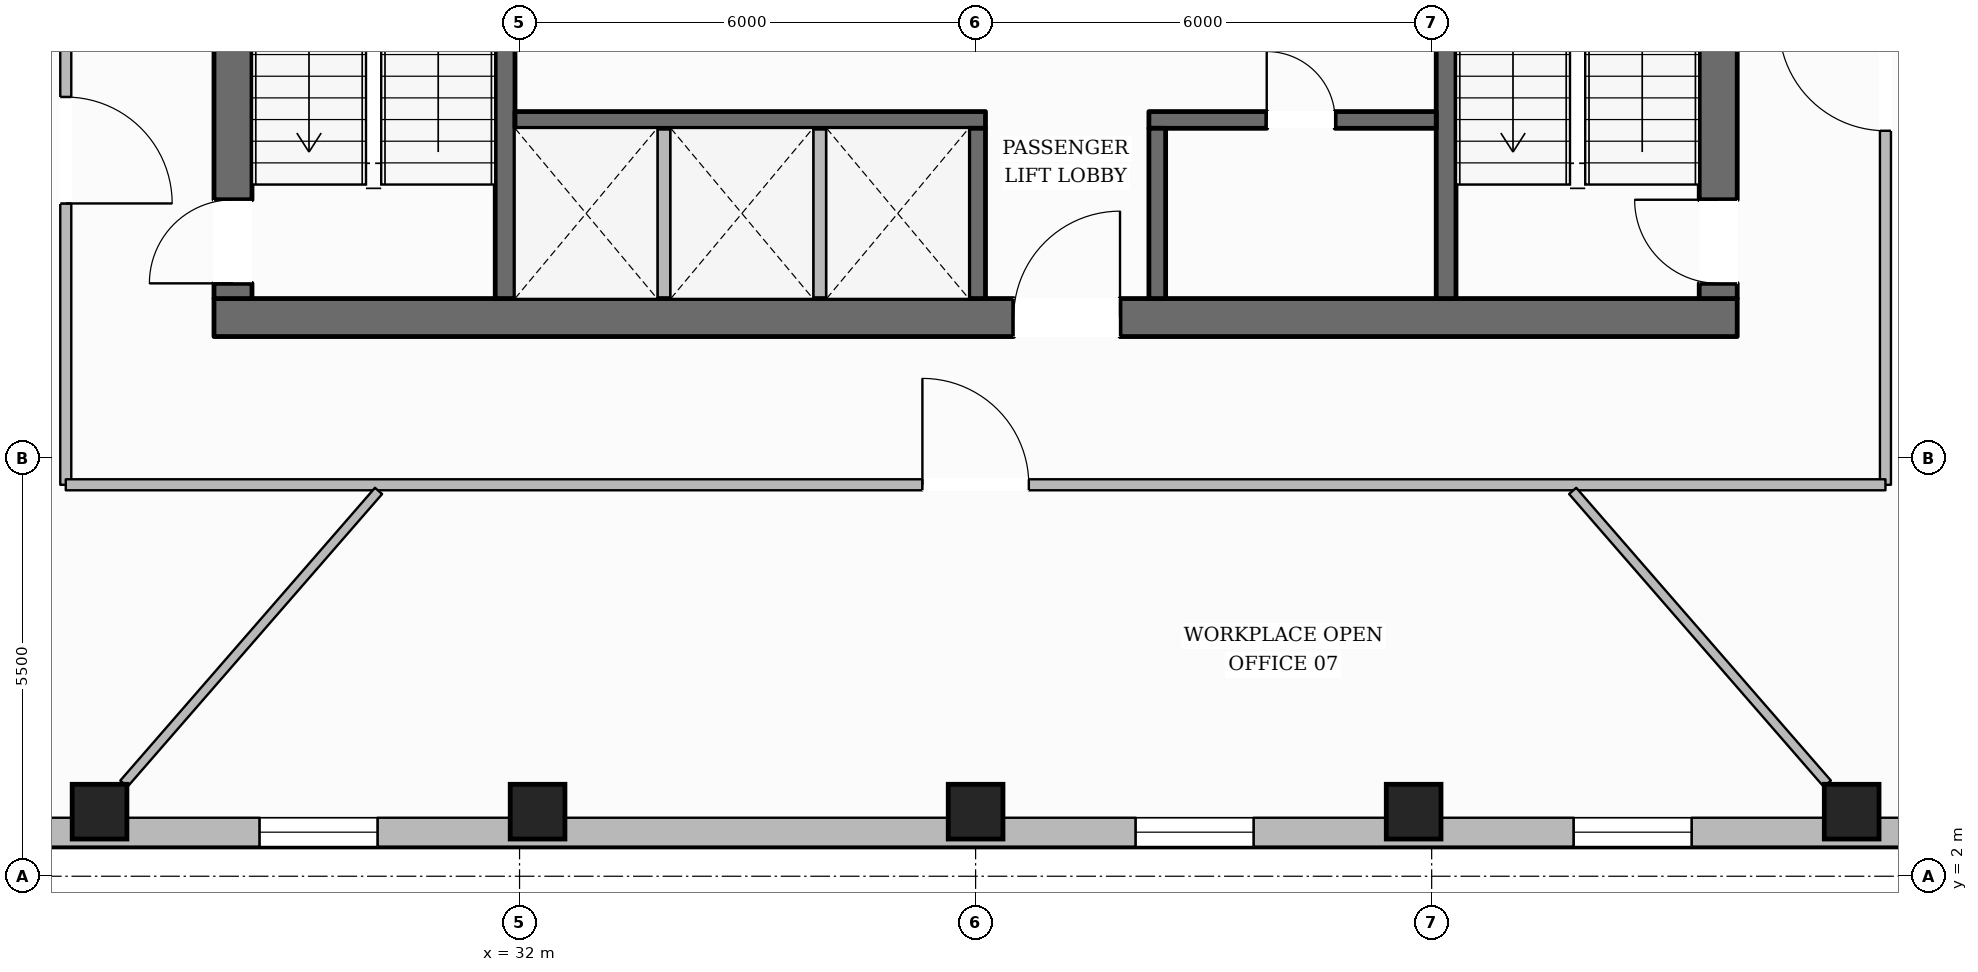
"""IFC4 building model, lengths in metres.
Left out: names, types, materials, properties, quantities, classifications, styles, units other than length and angle.
Written with IfcOpenShell. Run it as: python <this file> out.ifc"""

import sys

from ifc_helpers import new_model, si_unit, direction, frame, frame_2d, origin, origin_2d, place, context, subcontext, project, spatial, rectangle, hollow_rectangle, extrude, element, fill, save


model = new_model("IFC4")
c1 = context("Model", 3, precision=1e-05, world=origin(), true_north=direction((0.0, 1.0)))
c2 = subcontext(c1, "Body", "Model", "MODEL_VIEW")
j1 = project(units=[si_unit("LENGTHUNIT", "METRE"), si_unit("PLANEANGLEUNIT", "RADIAN")], contexts=[c1])
p1 = place(None, origin())
s1 = spatial("IfcSite", under=j1, at=p1, CompositionType="ELEMENT")
p2 = place(p1, origin())
s2 = spatial("IfcBuilding", under=s1, at=p2, CompositionType="ELEMENT")
p3 = place(p2, frame((0.0, 0.0, 93.2)))
s3 = spatial("IfcBuildingStorey", under=s2, at=p3, CompositionType="ELEMENT", Elevation=93.2)
p4 = place(p3, frame((27.98, 9.35, 0.0), z_axis=(0.0, 0.0, 1.0), x_axis=(1.0, 0.0, 0.0)))
e1 = element("IfcWall", 1, at=p4, inside=s3, PredefinedType="SOLIDWALL", context=c2, shape_type="SweptSolid", body=[
    extrude(rectangle(XDim=20.04, YDim=0.5, at=frame_2d((10.02, 0.0))), origin(), (0.0, 0.0, 1.0), 3.6),
])
p5 = place(p4, frame((10.52, 0.0, 0.0)))
e2 = element("IfcOpeningElement", 2, at=p5, cuts=e1, PredefinedType="OPENING", context=c2, shape_type="SweptSolid", body=[
    extrude(rectangle(XDim=1.4, YDim=2.2, at=frame_2d((0.7, 1.1))), frame((0.0, 0.26, 0.0), z_axis=(0.0, -1.0, 0.0), x_axis=(1.0, 0.0, 0.0)), (0.0, 0.0, 1.0), 0.52),
])
p6 = place(p3, frame((28.23, 9.6, 0.0), z_axis=(0.0, 0.0, 1.0), x_axis=(0.0, 1.0, 0.0)))
e3 = element("IfcWall", 3, at=p6, inside=s3, PredefinedType="SOLIDWALL", context=c2, shape_type="SweptSolid", body=[
    extrude(rectangle(XDim=13.0, YDim=0.5, at=frame_2d((6.5, 0.0))), origin(), (0.0, 0.0, 1.0), 3.6),
])
p7 = place(p6, frame((0.2, 0.0, 0.0)))
e4 = element("IfcOpeningElement", 4, at=p7, cuts=e3, PredefinedType="OPENING", context=c2, shape_type="SweptSolid", body=[
    extrude(rectangle(XDim=1.1, YDim=2.15, at=frame_2d((0.55, 1.075))), frame((0.0, 0.26, 0.0), z_axis=(0.0, -1.0, 0.0), x_axis=(1.0, 0.0, 0.0)), (0.0, 0.0, 1.0), 0.52),
])
p8 = place(p6, frame((8.4, 0.0, 0.0)))
e5 = element("IfcOpeningElement", 5, at=p8, cuts=e3, PredefinedType="OPENING", context=c2, shape_type="SweptSolid", body=[
    extrude(rectangle(XDim=0.9, YDim=2.1, at=frame_2d((0.45, 1.05))), frame((0.0, 0.26, 0.0), z_axis=(0.0, -1.0, 0.0), x_axis=(1.0, 0.0, 0.0)), (0.0, 0.0, 1.0), 0.52),
])
p9 = place(p3, frame((47.77, 9.6, 0.0), z_axis=(0.0, 0.0, 1.0), x_axis=(0.0, 1.0, 0.0)))
e6 = element("IfcWall", 6, at=p9, inside=s3, PredefinedType="SOLIDWALL", context=c2, shape_type="SweptSolid", body=[
    extrude(rectangle(XDim=13.0, YDim=0.5, at=frame_2d((6.5, 0.0))), origin(), (0.0, 0.0, 1.0), 3.6),
])
p10 = place(p9, frame((0.2, 0.0, 0.0)))
e7 = element("IfcOpeningElement", 7, at=p10, cuts=e6, PredefinedType="OPENING", context=c2, shape_type="SweptSolid", body=[
    extrude(rectangle(XDim=1.1, YDim=2.15, at=frame_2d((0.55, 1.075))), frame((0.0, 0.26, 0.0), z_axis=(0.0, -1.0, 0.0), x_axis=(1.0, 0.0, 0.0)), (0.0, 0.0, 1.0), 0.52),
])
p11 = place(p9, frame((8.4, 0.0, 0.0)))
e8 = element("IfcOpeningElement", 8, at=p11, cuts=e6, PredefinedType="OPENING", context=c2, shape_type="SweptSolid", body=[
    extrude(rectangle(XDim=0.9, YDim=2.1, at=frame_2d((0.45, 1.05))), frame((0.0, 0.26, 0.0), z_axis=(0.0, -1.0, 0.0), x_axis=(1.0, 0.0, 0.0)), (0.0, 0.0, 1.0), 0.52),
])
p12 = place(p3, frame((31.81, 9.6, 0.0), z_axis=(0.0, 0.0, 1.0), x_axis=(0.0, 1.0, 0.0)))
e9 = element("IfcWall", 9, at=p12, inside=s3, PredefinedType="SHEAR", context=c2, shape_type="SweptSolid", body=[
    extrude(rectangle(XDim=13.0, YDim=0.26, at=frame_2d((6.5, 0.0))), origin(), (0.0, 0.0, 1.0), 3.6),
])
p13 = place(p12, frame((10.925, 0.0, 0.0)))
e10 = element("IfcOpeningElement", 10, at=p13, cuts=e9, PredefinedType="OPENING", context=c2, shape_type="SweptSolid", body=[
    extrude(rectangle(XDim=1.25, YDim=2.25, at=frame_2d((0.625, 1.125))), frame((0.0, 0.14, 0.0), z_axis=(0.0, -1.0, 0.0), x_axis=(1.0, 0.0, 0.0)), (0.0, 0.0, 1.0), 0.28),
])
p14 = place(p3, frame((44.19, 9.6, 0.0), z_axis=(0.0, 0.0, 1.0), x_axis=(0.0, 1.0, 0.0)))
e11 = element("IfcWall", 11, at=p14, inside=s3, PredefinedType="SHEAR", context=c2, shape_type="SweptSolid", body=[
    extrude(rectangle(XDim=13.0, YDim=0.26, at=frame_2d((6.5, 0.0))), origin(), (0.0, 0.0, 1.0), 3.6),
])
p15 = place(p14, frame((10.925, 0.0, 0.0)))
e12 = element("IfcOpeningElement", 12, at=p15, cuts=e11, PredefinedType="OPENING", context=c2, shape_type="SweptSolid", body=[
    extrude(rectangle(XDim=1.25, YDim=2.25, at=frame_2d((0.625, 1.125))), frame((0.0, 0.14, 0.0), z_axis=(0.0, -1.0, 0.0), x_axis=(1.0, 0.0, 0.0)), (0.0, 0.0, 1.0), 0.28),
])
p16 = place(p3, frame((31.94, 11.95, 0.0), z_axis=(0.0, 0.0, 1.0), x_axis=(1.0, 0.0, 0.0)))
e13 = element("IfcWall", 13, at=p16, inside=s3, PredefinedType="SOLIDWALL", context=c2, shape_type="SweptSolid", body=[
    extrude(rectangle(XDim=6.19, YDim=0.22, at=frame_2d((3.095, 0.0))), origin(), (0.0, 0.0, 1.0), 3.6),
])
p17 = place(p3, frame((40.28, 11.95, 0.0), z_axis=(0.0, 0.0, 1.0), x_axis=(1.0, 0.0, 0.0)))
e14 = element("IfcWall", 14, at=p17, inside=s3, PredefinedType="SOLIDWALL", context=c2, shape_type="SweptSolid", body=[
    extrude(rectangle(XDim=3.78, YDim=0.22, at=frame_2d((1.89, 0.0))), origin(), (0.0, 0.0, 1.0), 3.6),
])
p18 = place(p17, frame((1.55, 0.0, 0.0)))
e15 = element("IfcOpeningElement", 15, at=p18, cuts=e14, PredefinedType="OPENING", context=c2, shape_type="SweptSolid", body=[
    extrude(rectangle(XDim=0.9, YDim=2.1, at=frame_2d((0.45, 1.05))), frame((0.0, 0.12, 0.0), z_axis=(0.0, -1.0, 0.0), x_axis=(1.0, 0.0, 0.0)), (0.0, 0.0, 1.0), 0.24),
])
for number, where, z_axis, x_axis in (
    (16, (38.02, 9.6, 0.0), (0.0, 0.0, 1.0), (0.0, 1.0, 0.0)),
    (17, (40.39, 9.6, 0.0), (0.0, 0.0, 1.0), (0.0, 1.0, 0.0)),
):
    element("IfcWall", number, at=place(p3, frame(where, z_axis=z_axis, x_axis=x_axis)), inside=s3, PredefinedType="SOLIDWALL", context=c2, shape_type="SweptSolid", body=[
        extrude(rectangle(XDim=2.24, YDim=0.22, at=frame_2d((1.12, 0.0))), origin(), (0.0, 0.0, 1.0), 3.6),
    ])
for number, where, z_axis, x_axis in (
    (18, (26.474, 2.85, 0.0), (0.0, 0.0, 1.0), (1.0, 0.0, 0.0)),
    (19, (32.237, 2.85, 0.0), (0.0, 0.0, 1.0), (1.0, 0.0, 0.0)),
    (20, (38.0, 2.85, 0.0), (0.0, 0.0, 1.0), (1.0, 0.0, 0.0)),
    (21, (43.763, 2.85, 0.0), (0.0, 0.0, 1.0), (1.0, 0.0, 0.0)),
    (22, (49.526, 2.85, 0.0), (0.0, 0.0, 1.0), (1.0, 0.0, 0.0)),
):
    element("IfcColumn", number, at=place(p3, frame(where, z_axis=z_axis, x_axis=x_axis)), inside=s3, PredefinedType="COLUMN", context=c2, shape_type="SweptSolid", body=[
        extrude(hollow_rectangle(XDim=0.72, YDim=0.72, WallThickness=0.032, at=origin_2d()), origin(), (0.0, 0.0, 1.0), 3.6),
    ])
p19 = place(p3, frame((55.768, 2.58, 0.0), z_axis=(0.0, 0.0, 1.0), x_axis=(-1.0, 0.0, 0.0)))
e23 = element("IfcWall", 23, at=p19, inside=s3, PredefinedType="STANDARD", context=c2, shape_type="SweptSolid", body=[
    extrude(rectangle(XDim=35.535, YDim=0.38, at=frame_2d((17.768, 0.0))), origin(), (0.0, 0.0, 1.0), 3.059),
])
p20 = place(p19, frame((31.399, 0.0, 0.65)))
e24 = element("IfcOpeningElement", 24, at=p20, cuts=e23, PredefinedType="OPENING", context=c2, shape_type="SweptSolid", body=[
    extrude(rectangle(XDim=1.55, YDim=1.75, at=frame_2d((0.775, 0.875))), frame((0.0, 0.2, 0.0), z_axis=(0.0, -1.0, 0.0), x_axis=(1.0, 0.0, 0.0)), (0.0, 0.0, 1.0), 0.4),
])
p21 = place(p19, frame((25.637, 0.0, 0.65)))
e25 = element("IfcOpeningElement", 25, at=p21, cuts=e23, PredefinedType="OPENING", context=c2, shape_type="SweptSolid", body=[
    extrude(rectangle(XDim=1.55, YDim=1.75, at=frame_2d((0.775, 0.875))), frame((0.0, 0.2, 0.0), z_axis=(0.0, -1.0, 0.0), x_axis=(1.0, 0.0, 0.0)), (0.0, 0.0, 1.0), 0.4),
])
p22 = place(p19, frame((14.111, 0.0, 0.65)))
e26 = element("IfcOpeningElement", 26, at=p22, cuts=e23, PredefinedType="OPENING", context=c2, shape_type="SweptSolid", body=[
    extrude(rectangle(XDim=1.55, YDim=1.75, at=frame_2d((0.775, 0.875))), frame((0.0, 0.2, 0.0), z_axis=(0.0, -1.0, 0.0), x_axis=(1.0, 0.0, 0.0)), (0.0, 0.0, 1.0), 0.4),
])
p23 = place(p19, frame((8.348, 0.0, 0.65)))
e27 = element("IfcOpeningElement", 27, at=p23, cuts=e23, PredefinedType="OPENING", context=c2, shape_type="SweptSolid", body=[
    extrude(rectangle(XDim=1.55, YDim=1.75, at=frame_2d((0.775, 0.875))), frame((0.0, 0.2, 0.0), z_axis=(0.0, -1.0, 0.0), x_axis=(1.0, 0.0, 0.0)), (0.0, 0.0, 1.0), 0.4),
])
p24 = place(p19, frame((2.585, 0.0, 0.65)))
e28 = element("IfcOpeningElement", 28, at=p24, cuts=e23, PredefinedType="OPENING", context=c2, shape_type="SweptSolid", body=[
    extrude(rectangle(XDim=1.55, YDim=1.75, at=frame_2d((0.775, 0.875))), frame((0.0, 0.2, 0.0), z_axis=(0.0, -1.0, 0.0), x_axis=(1.0, 0.0, 0.0)), (0.0, 0.0, 1.0), 0.4),
])
for number, where, z_axis, x_axis in (
    (29, (33.9, 9.55, 0.0), (0.0, 0.0, 1.0), (0.0, 1.0, 0.0)),
    (30, (35.95, 9.55, 0.0), (0.0, 0.0, 1.0), (0.0, 1.0, 0.0)),
):
    element("IfcWall", number, at=place(p3, frame(where, z_axis=z_axis, x_axis=x_axis)), inside=s3, PredefinedType="PARTITIONING", context=c2, shape_type="SweptSolid", body=[
        extrude(rectangle(XDim=2.29, YDim=0.165, at=frame_2d((1.145, 0.0))), origin(), (0.0, 0.0, 1.0), 3.6),
    ])
p25 = place(p3, frame((49.97, 7.15, 0.0), z_axis=(0.0, 0.0, 1.0), x_axis=(0.0, 1.0, 0.0)))
e31 = element("IfcWall", 31, at=p25, inside=s3, PredefinedType="PARTITIONING", context=c2, shape_type="SweptSolid", body=[
    extrude(rectangle(XDim=17.9, YDim=0.145, at=frame_2d((8.95, 0.0))), origin(), (0.0, 0.0, 1.0), 3.288),
])
p26 = place(p25, frame((13.437, 0.0, 0.0)))
e32 = element("IfcOpeningElement", 32, at=p26, cuts=e31, PredefinedType="OPENING", context=c2, shape_type="SweptSolid", body=[
    extrude(rectangle(XDim=1.4, YDim=2.2, at=frame_2d((0.7, 1.1))), frame((0.0, 0.083, 0.0), z_axis=(0.0, -1.0, 0.0), x_axis=(1.0, 0.0, 0.0)), (0.0, 0.0, 1.0), 0.165),
])
p27 = place(p25, frame((4.658, 0.0, 0.0)))
e33 = element("IfcOpeningElement", 33, at=p27, cuts=e31, PredefinedType="OPENING", context=c2, shape_type="SweptSolid", body=[
    extrude(rectangle(XDim=1.4, YDim=2.2, at=frame_2d((0.7, 1.1))), frame((0.0, 0.083, 0.0), z_axis=(0.0, -1.0, 0.0), x_axis=(1.0, 0.0, 0.0)), (0.0, 0.0, 1.0), 0.165),
])
p28 = place(p3, frame((26.03, 25.05, 0.0), z_axis=(0.0, 0.0, 1.0), x_axis=(0.0, -1.0, 0.0)))
e34 = element("IfcWall", 34, at=p28, inside=s3, PredefinedType="PARTITIONING", context=c2, shape_type="SweptSolid", body=[
    extrude(rectangle(XDim=17.9, YDim=0.145, at=frame_2d((8.95, 0.0))), origin(), (0.0, 0.0, 1.0), 3.288),
])
p29 = place(p28, frame((4.67, 0.0, 0.0)))
e35 = element("IfcOpeningElement", 35, at=p29, cuts=e34, PredefinedType="OPENING", context=c2, shape_type="SweptSolid", body=[
    extrude(rectangle(XDim=0.98, YDim=2.15, at=frame_2d((0.49, 1.075))), frame((0.0, 0.083, 0.0), z_axis=(0.0, -1.0, 0.0), x_axis=(1.0, 0.0, 0.0)), (0.0, 0.0, 1.0), 0.165),
])
p30 = place(p28, frame((12.799, 0.0, 0.0)))
e36 = element("IfcOpeningElement", 36, at=p30, cuts=e34, PredefinedType="OPENING", context=c2, shape_type="SweptSolid", body=[
    extrude(rectangle(XDim=1.4, YDim=2.2, at=frame_2d((0.7, 1.1))), frame((0.0, 0.083, 0.0), z_axis=(0.0, -1.0, 0.0), x_axis=(1.0, 0.0, 0.0)), (0.0, 0.0, 1.0), 0.165),
])
p31 = place(p3, frame((26.03, 7.15, 0.0), z_axis=(0.0, 0.0, 1.0), x_axis=(1.0, 0.0, 0.0)))
e37 = element("IfcWall", 37, at=p31, inside=s3, PredefinedType="PARTITIONING", context=c2, shape_type="SweptSolid", body=[
    extrude(rectangle(XDim=23.94, YDim=0.145, at=frame_2d((11.97, 0.0))), origin(), (0.0, 0.0, 1.0), 3.6),
])
p32 = place(p31, frame((11.27, 0.0, 0.0)))
e38 = element("IfcOpeningElement", 38, at=p32, cuts=e37, PredefinedType="OPENING", context=c2, shape_type="SweptSolid", body=[
    extrude(rectangle(XDim=1.4, YDim=2.2, at=frame_2d((0.7, 1.1))), frame((0.0, 0.083, 0.0), z_axis=(0.0, -1.0, 0.0), x_axis=(1.0, 0.0, 0.0)), (0.0, 0.0, 1.0), 0.165),
])
for number, where, z_axis, x_axis in (
    (39, (30.145, 7.07, 0.0), (0.0, 0.0, 1.0), (-0.656, -0.754, 0.0)),
    (40, (45.855, 7.07, 0.0), (0.0, 0.0, 1.0), (0.656, -0.754, 0.0)),
):
    element("IfcWall", number, at=place(p3, frame(where, z_axis=z_axis, x_axis=x_axis)), inside=s3, PredefinedType="PARTITIONING", context=c2, shape_type="SweptSolid", body=[
        extrude(rectangle(XDim=5.105, YDim=0.125, at=frame_2d((2.553, 0.0))), origin(), (0.0, 0.0, 1.0), 3.6),
    ])
p33 = place(p21, origin())
e41 = element("IfcWindow", 41, at=p33, inside=s3, PartitioningType="SINGLE_PANEL", PredefinedType="WINDOW", context=c2, shape_type="SweptSolid", body=[
    extrude(rectangle(XDim=1.55, YDim=1.75, at=frame_2d((0.775, 0.875))), frame((0.0, 0.03, 0.0), z_axis=(0.0, -1.0, 0.0), x_axis=(1.0, 0.0, 0.0)), (0.0, 0.0, 1.0), 0.06),
])
fill(e25, e41)
p34 = place(p22, origin())
e42 = element("IfcWindow", 42, at=p34, inside=s3, PartitioningType="SINGLE_PANEL", PredefinedType="WINDOW", context=c2, shape_type="SweptSolid", body=[
    extrude(rectangle(XDim=1.55, YDim=1.75, at=frame_2d((0.775, 0.875))), frame((0.0, 0.03, 0.0), z_axis=(0.0, -1.0, 0.0), x_axis=(1.0, 0.0, 0.0)), (0.0, 0.0, 1.0), 0.06),
])
fill(e26, e42)
p35 = place(p23, origin())
e43 = element("IfcWindow", 43, at=p35, inside=s3, PartitioningType="SINGLE_PANEL", PredefinedType="WINDOW", context=c2, shape_type="SweptSolid", body=[
    extrude(rectangle(XDim=1.55, YDim=1.75, at=frame_2d((0.775, 0.875))), frame((0.0, 0.03, 0.0), z_axis=(0.0, -1.0, 0.0), x_axis=(1.0, 0.0, 0.0)), (0.0, 0.0, 1.0), 0.06),
])
fill(e27, e43)
p36 = place(p7, origin())
e44 = element("IfcDoor", 44, at=p36, inside=s3, OperationType="SINGLE_SWING_LEFT", PredefinedType="DOOR", context=c2, shape_type="SweptSolid", body=[
    extrude(rectangle(XDim=1.1, YDim=2.15, at=frame_2d((0.55, 1.075))), frame((0.0, 0.025, 0.0), z_axis=(0.0, -1.0, 0.0), x_axis=(1.0, 0.0, 0.0)), (0.0, 0.0, 1.0), 0.05),
])
fill(e4, e44)
p37 = place(p10, origin())
e45 = element("IfcDoor", 45, at=p37, inside=s3, OperationType="SINGLE_SWING_RIGHT", PredefinedType="DOOR", context=c2, shape_type="SweptSolid", body=[
    extrude(rectangle(XDim=1.1, YDim=2.15, at=frame_2d((0.55, 1.075))), frame((0.0, 0.025, 0.0), z_axis=(0.0, -1.0, 0.0), x_axis=(1.0, 0.0, 0.0)), (0.0, 0.0, 1.0), 0.05),
])
fill(e7, e45)
p38 = place(p5, origin())
e46 = element("IfcDoor", 46, at=p38, inside=s3, OperationType="SINGLE_SWING_RIGHT", PredefinedType="DOOR", context=c2, shape_type="SweptSolid", body=[
    extrude(rectangle(XDim=1.4, YDim=2.2, at=frame_2d((0.7, 1.1))), frame((0.0, 0.025, 0.0), z_axis=(0.0, -1.0, 0.0), x_axis=(1.0, 0.0, 0.0)), (0.0, 0.0, 1.0), 0.05),
])
fill(e2, e46)
p39 = place(p18, origin())
e47 = element("IfcDoor", 47, at=p39, inside=s3, OperationType="SINGLE_SWING_LEFT", PredefinedType="DOOR", context=c2, shape_type="SweptSolid", body=[
    extrude(rectangle(XDim=0.9, YDim=2.1, at=frame_2d((0.45, 1.05))), frame((0.0, 0.025, 0.0), z_axis=(0.0, -1.0, 0.0), x_axis=(1.0, 0.0, 0.0)), (0.0, 0.0, 1.0), 0.05),
])
fill(e15, e47)
p40 = place(p30, origin())
e48 = element("IfcDoor", 48, at=p40, inside=s3, OperationType="SINGLE_SWING_RIGHT", PredefinedType="DOOR", context=c2, shape_type="SweptSolid", body=[
    extrude(rectangle(XDim=1.4, YDim=2.2, at=frame_2d((0.7, 1.1))), frame((0.0, 0.025, 0.0), z_axis=(0.0, -1.0, 0.0), x_axis=(1.0, 0.0, 0.0)), (0.0, 0.0, 1.0), 0.05),
])
fill(e36, e48)
p41 = place(p32, origin())
e49 = element("IfcDoor", 49, at=p41, inside=s3, OperationType="SINGLE_SWING_LEFT", PredefinedType="DOOR", context=c2, shape_type="SweptSolid", body=[
    extrude(rectangle(XDim=1.4, YDim=2.2, at=frame_2d((0.7, 1.1))), frame((0.0, 0.025, 0.0), z_axis=(0.0, -1.0, 0.0), x_axis=(1.0, 0.0, 0.0)), (0.0, 0.0, 1.0), 0.05),
])
fill(e38, e49)
p42 = place(p27, origin())
e50 = element("IfcDoor", 50, at=p42, inside=s3, OperationType="SINGLE_SWING_RIGHT", PredefinedType="DOOR", context=c2, shape_type="SweptSolid", body=[
    extrude(rectangle(XDim=1.4, YDim=2.2, at=frame_2d((0.7, 1.1))), frame((0.0, 0.025, 0.0), z_axis=(0.0, -1.0, 0.0), x_axis=(1.0, 0.0, 0.0)), (0.0, 0.0, 1.0), 0.05),
])
fill(e33, e50)
save(model, sys.argv[1])
